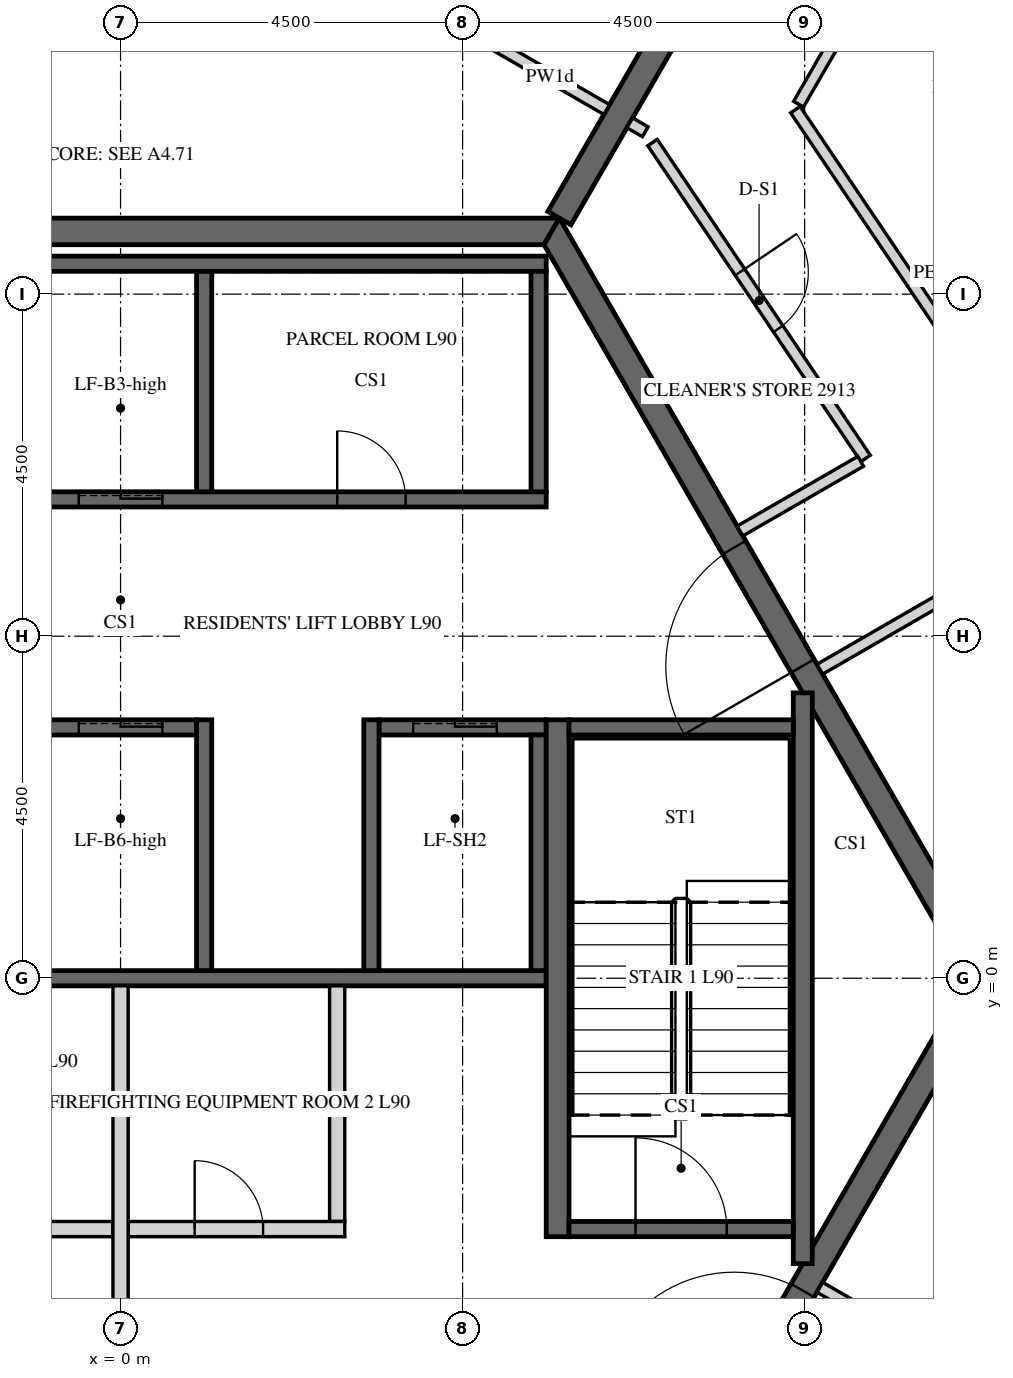
"""IFC4 building model, lengths in metres.
Left out: names, types, materials, properties, quantities, classifications, styles, units other than length and angle.
Written with IfcOpenShell. Run it as: python <this file> out.ifc"""

import sys

from ifc_helpers import new_model, si_unit, direction, frame, frame_2d, origin, place, context, subcontext, project, spatial, polyline, rectangle, outline, extrude, element, fill, save


model = new_model("IFC4")
c1 = context("Model", 3, precision=1e-05, world=origin(), true_north=direction((0.0, 1.0)))
c2 = subcontext(c1, "Body", "Model", "MODEL_VIEW")
j1 = project(units=[si_unit("LENGTHUNIT", "METRE"), si_unit("PLANEANGLEUNIT", "RADIAN")], contexts=[c1])
p1 = place(None, origin())
s1 = spatial("IfcSite", under=j1, at=p1, CompositionType="ELEMENT")
p2 = place(p1, origin())
s2 = spatial("IfcBuilding", under=s1, at=p2, CompositionType="ELEMENT")
p3 = place(p2, frame((0.0, 0.0, 372.9)))
s3 = spatial("IfcBuildingStorey", under=s2, at=p3, CompositionType="ELEMENT", Elevation=372.9)
p4 = place(p3, frame((5.673, -9.825, -0.15), z_axis=(0.0, 0.0, 1.0), x_axis=(0.499995046907, 0.866028263435, 0.0)))
e1 = element("IfcWall", 1, at=p4, inside=s3, PredefinedType="SHEAR", context=c2, shape_type="SweptSolid", body=[
    extrude(outline(polyline([(-0.101, -0.175), (11.446, -0.175), (11.244, 0.175), (0.101, 0.175), (-0.101, -0.175)])), origin(), (0.0, 0.0, 1.0), 3.55),
])
p5 = place(p4, frame((4.801, 0.0, 0.15)))
e2 = element("IfcOpeningElement", 2, at=p5, cuts=e1, PredefinedType="OPENING", context=c2, shape_type="SweptSolid", body=[
    extrude(rectangle(XDim=1.8, YDim=2.4, at=frame_2d((0.9, 1.2))), frame((0.0, 0.185, 0.0), z_axis=(0.0, -1.0, 0.0), x_axis=(1.0, 0.0, 0.0)), (0.0, 0.0, 1.0), 0.37),
])
p6 = place(p3, frame((11.345, 0.0, -0.15), z_axis=(0.0, 0.0, 1.0), x_axis=(-0.499995046907, 0.866028263435, 0.0)))
e3 = element("IfcWall", 3, at=p6, inside=s3, PredefinedType="SHEAR", context=c2, shape_type="SweptSolid", body=[
    extrude(outline(polyline([(-0.101, -0.175), (11.446, -0.175), (11.244, 0.175), (0.101, 0.175), (-0.101, -0.175)])), origin(), (0.0, 0.0, 1.0), 3.55),
])
p7 = place(p6, frame((4.744, 0.0, 0.15)))
e4 = element("IfcOpeningElement", 4, at=p7, cuts=e3, PredefinedType="OPENING", context=c2, shape_type="SweptSolid", body=[
    extrude(rectangle(XDim=1.8, YDim=2.4, at=frame_2d((0.9, 1.2))), frame((0.0, 0.185, 0.0), z_axis=(0.0, -1.0, 0.0), x_axis=(1.0, 0.0, 0.0)), (0.0, 0.0, 1.0), 0.37),
])
p8 = place(p3, frame((5.673, 9.825, -0.15), z_axis=(0.0, 0.0, 1.0), x_axis=(-1.0, 0.0, 0.0)))
e5 = element("IfcWall", 5, at=p8, inside=s3, PredefinedType="SHEAR", context=c2, shape_type="SweptSolid", body=[
    extrude(outline(polyline([(-0.101, -0.175), (11.446, -0.175), (11.244, 0.175), (0.101, 0.175), (-0.101, -0.175)])), origin(), (0.0, 0.0, 1.0), 3.55),
])
p9 = place(p3, frame((5.773, 10.0, -0.15), z_axis=(0.0, 0.0, 1.0), x_axis=(0.500007911273, 0.866020836161, 0.0)))
e6 = element("IfcWall", 6, at=p9, inside=s3, PredefinedType="SHEAR", context=c2, shape_type="SweptSolid", body=[
    extrude(rectangle(XDim=14.51, YDim=0.35, at=frame_2d((7.255, 0.0))), origin(), (0.0, 0.0, 1.0), 3.55),
])
p10 = place(p9, frame((6.355, 0.0, 0.15)))
e7 = element("IfcOpeningElement", 7, at=p10, cuts=e6, PredefinedType="OPENING", context=c2, shape_type="SweptSolid", body=[
    extrude(rectangle(XDim=1.8, YDim=2.4, at=frame_2d((0.9, 1.2))), frame((0.0, 0.185, 0.0), z_axis=(0.0, -1.0, 0.0), x_axis=(1.0, 0.0, 0.0)), (0.0, 0.0, 1.0), 0.37),
])
p11 = place(p3, frame((-5.6, 6.3, -0.25), z_axis=(0.0, 0.0, 1.0), x_axis=(1.0, 0.0, 0.0)))
e8 = element("IfcWall", 8, at=p11, inside=s3, PredefinedType="SHEAR", context=c2, shape_type="SweptSolid", body=[
    extrude(rectangle(XDim=11.2, YDim=0.2, at=frame_2d((5.6, 0.0))), origin(), (0.0, 0.0, 1.0), 3.9),
])
p12 = place(p11, frame((8.45, 0.0, 0.25)))
e9 = element("IfcOpeningElement", 9, at=p12, cuts=e8, PredefinedType="OPENING", context=c2, shape_type="SweptSolid", body=[
    extrude(rectangle(XDim=0.9, YDim=2.1, at=frame_2d((0.45, 1.05))), frame((0.0, 0.11, 0.0), z_axis=(0.0, -1.0, 0.0), x_axis=(1.0, 0.0, 0.0)), (0.0, 0.0, 1.0), 0.22),
])
p13 = place(p11, frame((0.65, 0.0, 0.25)))
e10 = element("IfcOpeningElement", 10, at=p13, cuts=e8, PredefinedType="OPENING", context=c2, shape_type="SweptSolid", body=[
    extrude(rectangle(XDim=1.1, YDim=2.1, at=frame_2d((0.55, 1.05))), frame((0.0, 0.11, 0.0), z_axis=(0.0, -1.0, 0.0), x_axis=(1.0, 0.0, 0.0)), (0.0, 0.0, 1.0), 0.22),
])
p14 = place(p11, frame((2.85, 0.0, 0.25)))
e11 = element("IfcOpeningElement", 11, at=p14, cuts=e8, PredefinedType="OPENING", context=c2, shape_type="SweptSolid", body=[
    extrude(rectangle(XDim=1.1, YDim=2.1, at=frame_2d((0.55, 1.05))), frame((0.0, 0.11, 0.0), z_axis=(0.0, -1.0, 0.0), x_axis=(1.0, 0.0, 0.0)), (0.0, 0.0, 1.0), 0.22),
])
p15 = place(p11, frame((5.05, 0.0, 0.25)))
e12 = element("IfcOpeningElement", 12, at=p15, cuts=e8, PredefinedType="OPENING", context=c2, shape_type="SweptSolid", body=[
    extrude(rectangle(XDim=1.1, YDim=2.1, at=frame_2d((0.55, 1.05))), frame((0.0, 0.11, 0.0), z_axis=(0.0, -1.0, 0.0), x_axis=(1.0, 0.0, 0.0)), (0.0, 0.0, 1.0), 0.22),
])
p16 = place(p3, frame((-5.6, 9.4, -0.25), z_axis=(0.0, 0.0, 1.0), x_axis=(1.0, 0.0, 0.0)))
e13 = element("IfcWall", 13, at=p16, inside=s3, PredefinedType="SHEAR", context=c2, shape_type="SweptSolid", body=[
    extrude(rectangle(XDim=11.2, YDim=0.2, at=frame_2d((5.6, 0.0))), origin(), (0.0, 0.0, 1.0), 3.9),
])
for number, where, z_axis, x_axis in (
    (14, (1.1, 6.4, -0.25), (0.0, 0.0, 1.0), (0.0, 1.0, 0.0)),
    (15, (5.5, 6.4, -0.25), (0.0, 0.0, 1.0), (0.0, 1.0, 0.0)),
):
    element("IfcWall", number, at=place(p3, frame(where, z_axis=z_axis, x_axis=x_axis)), inside=s3, PredefinedType="SHEAR", context=c2, shape_type="SweptSolid", body=[
        extrude(rectangle(XDim=2.9, YDim=0.2, at=frame_2d((1.45, 0.0))), origin(), (0.0, 0.0, 1.0), 3.9),
    ])
p17 = place(p3, frame((-5.6, 3.3, -0.25), z_axis=(0.0, 0.0, 1.0), x_axis=(1.0, 0.0, 0.0)))
e16 = element("IfcWall", 16, at=p17, inside=s3, PredefinedType="SHEAR", context=c2, shape_type="SweptSolid", body=[
    extrude(rectangle(XDim=6.6, YDim=0.2, at=frame_2d((3.3, 0.0))), origin(), (0.0, 0.0, 1.0), 3.9),
])
p18 = place(p17, frame((0.65, 0.0, 0.25)))
e17 = element("IfcOpeningElement", 17, at=p18, cuts=e16, PredefinedType="OPENING", context=c2, shape_type="SweptSolid", body=[
    extrude(rectangle(XDim=1.1, YDim=2.1, at=frame_2d((0.55, 1.05))), frame((0.0, 0.11, 0.0), z_axis=(0.0, -1.0, 0.0), x_axis=(1.0, 0.0, 0.0)), (0.0, 0.0, 1.0), 0.22),
])
p19 = place(p17, frame((2.85, 0.0, 0.25)))
e18 = element("IfcOpeningElement", 18, at=p19, cuts=e16, PredefinedType="OPENING", context=c2, shape_type="SweptSolid", body=[
    extrude(rectangle(XDim=1.1, YDim=2.1, at=frame_2d((0.55, 1.05))), frame((0.0, 0.11, 0.0), z_axis=(0.0, -1.0, 0.0), x_axis=(1.0, 0.0, 0.0)), (0.0, 0.0, 1.0), 0.22),
])
p20 = place(p17, frame((5.05, 0.0, 0.25)))
e19 = element("IfcOpeningElement", 19, at=p20, cuts=e16, PredefinedType="OPENING", context=c2, shape_type="SweptSolid", body=[
    extrude(rectangle(XDim=1.1, YDim=2.1, at=frame_2d((0.55, 1.05))), frame((0.0, 0.11, 0.0), z_axis=(0.0, -1.0, 0.0), x_axis=(1.0, 0.0, 0.0)), (0.0, 0.0, 1.0), 0.22),
])
p21 = place(p3, frame((3.4, 3.3, -0.25), z_axis=(0.0, 0.0, 1.0), x_axis=(1.0, 0.0, 0.0)))
e20 = element("IfcWall", 20, at=p21, inside=s3, PredefinedType="SHEAR", context=c2, shape_type="SweptSolid", body=[
    extrude(rectangle(XDim=2.2, YDim=0.2, at=frame_2d((1.1, 0.0))), origin(), (0.0, 0.0, 1.0), 3.9),
])
p22 = place(p21, frame((0.45, 0.0, 0.25)))
e21 = element("IfcOpeningElement", 21, at=p22, cuts=e20, PredefinedType="OPENING", context=c2, shape_type="SweptSolid", body=[
    extrude(rectangle(XDim=1.1, YDim=2.1, at=frame_2d((0.55, 1.05))), frame((0.0, 0.11, 0.0), z_axis=(0.0, -1.0, 0.0), x_axis=(1.0, 0.0, 0.0)), (0.0, 0.0, 1.0), 0.22),
])
p23 = place(p3, frame((-5.6, 0.0, -0.25), z_axis=(0.0, 0.0, 1.0), x_axis=(1.0, 0.0, 0.0)))
e22 = element("IfcWall", 22, at=p23, inside=s3, PredefinedType="SHEAR", context=c2, shape_type="SweptSolid", body=[
    extrude(rectangle(XDim=11.2, YDim=0.2, at=frame_2d((5.6, 0.0))), origin(), (0.0, 0.0, 1.0), 3.9),
])
for number, where, z_axis, x_axis in (
    (23, (1.1, 0.1, -0.25), (0.0, 0.0, 1.0), (0.0, 1.0, 0.0)),
    (24, (3.3, 0.1, -0.25), (0.0, 0.0, 1.0), (0.0, 1.0, 0.0)),
):
    element("IfcWall", number, at=place(p3, frame(where, z_axis=z_axis, x_axis=x_axis)), inside=s3, PredefinedType="SHEAR", context=c2, shape_type="SweptSolid", body=[
        extrude(rectangle(XDim=3.3, YDim=0.2, at=frame_2d((1.65, 0.0))), origin(), (0.0, 0.0, 1.0), 3.9),
    ])
p24 = place(p3, frame((5.5, 0.1, -0.25), z_axis=(0.0, 0.0, 1.0), x_axis=(0.0, 1.0, 0.0)))
e25 = element("IfcWall", 25, at=p24, inside=s3, PredefinedType="SHEAR", context=c2, shape_type="SweptSolid", body=[
    extrude(rectangle(XDim=3.1, YDim=0.2, at=frame_2d((1.55, 0.0))), origin(), (0.0, 0.0, 1.0), 3.9),
])
p25 = place(p3, frame((-5.6, -3.3, 0.0), z_axis=(0.0, 0.0, 1.0), x_axis=(1.0, 0.0, 0.0)))
e26 = element("IfcWall", 26, at=p25, inside=s3, PredefinedType="PARTITIONING", context=c2, shape_type="SweptSolid", body=[
    extrude(rectangle(XDim=5.5, YDim=0.2, at=frame_2d((2.75, 0.0))), origin(), (0.0, 0.0, 1.0), 3.65),
])
p26 = place(p25, frame((2.3, 0.0, 0.0)))
e27 = element("IfcOpeningElement", 27, at=p26, cuts=e26, PredefinedType="OPENING", context=c2, shape_type="SweptSolid", body=[
    extrude(rectangle(XDim=0.9, YDim=2.1, at=frame_2d((0.45, 1.05))), frame((0.0, 0.11, 0.0), z_axis=(0.0, -1.0, 0.0), x_axis=(1.0, 0.0, 0.0)), (0.0, 0.0, 1.0), 0.22),
])
p27 = place(p3, frame((0.1, -3.3, 0.0), z_axis=(0.0, 0.0, 1.0), x_axis=(1.0, 0.0, 0.0)))
e28 = element("IfcWall", 28, at=p27, inside=s3, PredefinedType="PARTITIONING", context=c2, shape_type="SweptSolid", body=[
    extrude(rectangle(XDim=2.85, YDim=0.2, at=frame_2d((1.425, 0.0))), origin(), (0.0, 0.0, 1.0), 3.65),
])
p28 = place(p27, frame((0.875, 0.0, 0.0)))
e29 = element("IfcOpeningElement", 29, at=p28, cuts=e28, PredefinedType="OPENING", context=c2, shape_type="SweptSolid", body=[
    extrude(rectangle(XDim=0.9, YDim=2.1, at=frame_2d((0.45, 1.05))), frame((0.0, 0.11, 0.0), z_axis=(0.0, -1.0, 0.0), x_axis=(1.0, 0.0, 0.0)), (0.0, 0.0, 1.0), 0.22),
])
p29 = place(p3, frame((2.85, -3.2, 0.0), z_axis=(0.0, 0.0, 1.0), x_axis=(0.0, 1.0, 0.0)))
e30 = element("IfcWall", 30, at=p29, inside=s3, PredefinedType="PARTITIONING", context=c2, shape_type="SweptSolid", body=[
    extrude(rectangle(XDim=3.1, YDim=0.2, at=frame_2d((1.55, 0.0))), origin(), (0.0, 0.0, 1.0), 3.65),
])
p30 = place(p3, frame((0.0, -6.2, 0.0), z_axis=(0.0, 0.0, 1.0), x_axis=(0.0, 1.0, 0.0)))
e31 = element("IfcWall", 31, at=p30, inside=s3, PredefinedType="PARTITIONING", context=c2, shape_type="SweptSolid", body=[
    extrude(rectangle(XDim=6.1, YDim=0.2, at=frame_2d((3.05, 0.0))), origin(), (0.0, 0.0, 1.0), 3.65),
])
p31 = place(p3, frame((5.75, -3.4, -0.25), z_axis=(0.0, 0.0, 1.0), x_axis=(0.0, 1.0, 0.0)))
e32 = element("IfcWall", 32, at=p31, inside=s3, PredefinedType="SHEAR", context=c2, shape_type="SweptSolid", body=[
    extrude(rectangle(XDim=6.8, YDim=0.3, at=frame_2d((3.4, 0.0))), origin(), (0.0, 0.0, 1.0), 3.9),
])
p32 = place(p3, frame((8.975, -3.755, -0.25), z_axis=(0.0, 0.0, 1.0), x_axis=(0.0, 1.0, 0.0)))
e33 = element("IfcWall", 33, at=p32, inside=s3, PredefinedType="SHEAR", context=c2, shape_type="SweptSolid", body=[
    extrude(rectangle(XDim=7.51, YDim=0.25, at=frame_2d((3.755, 0.0))), origin(), (0.0, 0.0, 1.0), 3.9),
])
p33 = place(p3, frame((5.9, 3.3, -0.25), z_axis=(0.0, 0.0, 1.0), x_axis=(1.0, 0.0, 0.0)))
e34 = element("IfcWall", 34, at=p33, inside=s3, PredefinedType="SHEAR", context=c2, shape_type="SweptSolid", body=[
    extrude(rectangle(XDim=2.95, YDim=0.2, at=frame_2d((1.475, 0.0))), origin(), (0.0, 0.0, 1.0), 3.9),
])
p34 = place(p3, frame((5.9, -3.3, -0.25), z_axis=(0.0, 0.0, 1.0), x_axis=(1.0, 0.0, 0.0)))
e35 = element("IfcWall", 35, at=p34, inside=s3, PredefinedType="SHEAR", context=c2, shape_type="SweptSolid", body=[
    extrude(rectangle(XDim=2.95, YDim=0.2, at=frame_2d((1.475, 0.0))), origin(), (0.0, 0.0, 1.0), 3.9),
])
p35 = place(p34, frame((0.875, 0.0, 0.25)))
e36 = element("IfcOpeningElement", 36, at=p35, cuts=e35, PredefinedType="OPENING", context=c2, shape_type="SweptSolid", body=[
    extrude(rectangle(XDim=1.2, YDim=2.4, at=frame_2d((0.6, 1.2))), frame((0.0, 0.11, 0.0), z_axis=(0.0, -1.0, 0.0), x_axis=(1.0, 0.0, 0.0)), (0.0, 0.0, 1.0), 0.22),
])
p36 = place(p3, frame((4.902, 12.291, 0.0), z_axis=(0.0, 0.0, 1.0), x_axis=(0.866074815912, -0.499914405916, 0.0)))
e37 = element("IfcWall", 37, at=p36, inside=s3, PredefinedType="PARTITIONING", context=c2, shape_type="SweptSolid", body=[
    extrude(rectangle(XDim=1.725, YDim=0.15, at=frame_2d((0.862, 0.0))), origin(), (0.0, 0.0, 1.0), 2.47),
])
p37 = place(p3, frame((10.697, -12.973, 0.0), z_axis=(0.0, 0.0, 1.0), x_axis=(0.499991115059, 0.866030533446, 0.0)))
e38 = element("IfcWall", 38, at=p37, inside=s3, PredefinedType="PARTITIONING", context=c2, shape_type="SweptSolid", body=[
    extrude(rectangle(XDim=13.504, YDim=0.15, at=frame_2d((6.752, 0.0))), origin(), (0.0, 0.0, 1.0), 2.47),
])
p38 = place(p37, frame((3.175, 0.0, 0.0)))
e39 = element("IfcOpeningElement", 39, at=p38, cuts=e38, PredefinedType="OPENING", context=c2, shape_type="SweptSolid", body=[
    extrude(rectangle(XDim=1.0, YDim=2.1, at=frame_2d((0.5, 1.05))), frame((0.0, 0.085, 0.0), z_axis=(0.0, -1.0, 0.0), x_axis=(1.0, 0.0, 0.0)), (0.0, 0.0, 1.0), 0.17),
])
p39 = place(p3, frame((17.401, -1.21, 0.0), z_axis=(0.0, 0.0, 1.0), x_axis=(-0.559186729505, 0.829041736914, 0.0)))
e40 = element("IfcWall", 40, at=p39, inside=s3, PredefinedType="PARTITIONING", context=c2, shape_type="SweptSolid", body=[
    extrude(rectangle(XDim=15.243, YDim=0.15, at=frame_2d((7.621, 0.0))), origin(), (0.0, 0.0, 1.0), 2.47),
])
p40 = place(p39, frame((5.802, 0.0, 0.0)))
e41 = element("IfcOpeningElement", 41, at=p40, cuts=e40, PredefinedType="OPENING", context=c2, shape_type="SweptSolid", body=[
    extrude(rectangle(XDim=1.0, YDim=2.1, at=frame_2d((0.5, 1.05))), frame((0.0, 0.085, 0.0), z_axis=(0.0, -1.0, 0.0), x_axis=(1.0, 0.0, 0.0)), (0.0, 0.0, 1.0), 0.17),
])
p41 = place(p3, frame((8.92, 11.499, 0.0), z_axis=(0.0, 0.0, 1.0), x_axis=(0.499984314267, 0.866034459757, 0.0)))
e42 = element("IfcWall", 42, at=p41, inside=s3, PredefinedType="PARTITIONING", context=c2, shape_type="SweptSolid", body=[
    extrude(rectangle(XDim=5.784, YDim=0.15, at=frame_2d((2.892, 0.0))), origin(), (0.0, 0.0, 1.0), 2.47),
])
p42 = place(p3, frame((9.2, 4.066, 0.0), z_axis=(0.0, 0.0, 1.0), x_axis=(0.866011447264, 0.500024172624, 0.0)))
e43 = element("IfcWall", 43, at=p42, inside=s3, PredefinedType="PARTITIONING", context=c2, shape_type="SweptSolid", body=[
    extrude(rectangle(XDim=2.055, YDim=0.15, at=frame_2d((1.027, 0.0))), origin(), (0.0, 0.0, 1.0), 2.47),
])
p43 = place(p3, frame((12.555, -6.003, 0.0), z_axis=(0.0, 0.0, 1.0), x_axis=(-0.866016658288, 0.500015147339, 0.0)))
e44 = element("IfcWall", 44, at=p43, inside=s3, PredefinedType="PARTITIONING", context=c2, shape_type="SweptSolid", body=[
    extrude(rectangle(XDim=3.875, YDim=0.15, at=frame_2d((1.938, 0.0))), origin(), (0.0, 0.0, 1.0), 2.47),
])
p44 = place(p3, frame((6.699, 11.254, 0.0), z_axis=(0.0, 0.0, 1.0), x_axis=(0.865544827262, -0.500831460673, 0.0)))
e45 = element("IfcWall", 45, at=p44, inside=s3, PredefinedType="PARTITIONING", context=c2, shape_type="SweptSolid", body=[
    extrude(rectangle(XDim=0.235, YDim=0.15, at=frame_2d((0.117, 0.0))), origin(), (0.0, 0.0, 1.0), 2.47),
])
p45 = place(p3, frame((6.999, 10.994, 0.0), z_axis=(0.0, 0.0, 1.0), x_axis=(0.55918759866, -0.82904115067, 0.0)))
e46 = element("IfcWall", 46, at=p45, inside=s3, PredefinedType="PARTITIONING", context=c2, shape_type="SweptSolid", body=[
    extrude(rectangle(XDim=5.013, YDim=0.15, at=frame_2d((2.506, 0.0))), origin(), (0.0, 0.0, 1.0), 2.47),
])
p46 = place(p45, frame((2.057, 0.0, 0.0)))
e47 = element("IfcOpeningElement", 47, at=p46, cuts=e46, PredefinedType="OPENING", context=c2, shape_type="SweptSolid", body=[
    extrude(rectangle(XDim=0.9, YDim=2.1, at=frame_2d((0.45, 1.05))), frame((0.0, 0.085, 0.0), z_axis=(0.0, -1.0, 0.0), x_axis=(1.0, 0.0, 0.0)), (0.0, 0.0, 1.0), 0.17),
])
p47 = place(p3, frame((9.737, 6.801, 0.0), z_axis=(0.0, 0.0, 1.0), x_axis=(-0.866045829247, -0.499964620392, 0.0)))
e48 = element("IfcWall", 48, at=p47, inside=s3, PredefinedType="PARTITIONING", context=c2, shape_type="SweptSolid", body=[
    extrude(rectangle(XDim=1.833, YDim=0.15, at=frame_2d((0.917, 0.0))), origin(), (0.0, 0.0, 1.0), 2.47),
])
p48 = place(p7, origin())
e49 = element("IfcDoor", 49, at=p48, inside=s3, OperationType="DOUBLE_DOOR_SINGLE_SWING", PredefinedType="DOOR", context=c2, shape_type="SweptSolid", body=[
    extrude(rectangle(XDim=1.8, YDim=2.4, at=frame_2d((0.9, 1.2))), frame((0.0, 0.025, 0.0), z_axis=(0.0, -1.0, 0.0), x_axis=(1.0, 0.0, 0.0)), (0.0, 0.0, 1.0), 0.05),
])
fill(e4, e49)
p49 = place(p5, origin())
e50 = element("IfcDoor", 50, at=p49, inside=s3, OperationType="DOUBLE_DOOR_SINGLE_SWING", PredefinedType="DOOR", context=c2, shape_type="SweptSolid", body=[
    extrude(rectangle(XDim=1.8, YDim=2.4, at=frame_2d((0.9, 1.2))), frame((0.0, 0.025, 0.0), z_axis=(0.0, -1.0, 0.0), x_axis=(1.0, 0.0, 0.0)), (0.0, 0.0, 1.0), 0.05),
])
fill(e2, e50)
p50 = place(p28, origin())
e51 = element("IfcDoor", 51, at=p50, inside=s3, OperationType="SINGLE_SWING_LEFT", PredefinedType="DOOR", context=c2, shape_type="SweptSolid", body=[
    extrude(rectangle(XDim=0.9, YDim=2.1, at=frame_2d((0.45, 1.05))), frame((0.0, 0.025, 0.0), z_axis=(0.0, -1.0, 0.0), x_axis=(1.0, 0.0, 0.0)), (0.0, 0.0, 1.0), 0.05),
])
fill(e29, e51)
p51 = place(p12, origin())
e52 = element("IfcDoor", 52, at=p51, inside=s3, OperationType="SINGLE_SWING_LEFT", PredefinedType="DOOR", context=c2, shape_type="SweptSolid", body=[
    extrude(rectangle(XDim=0.9, YDim=2.1, at=frame_2d((0.45, 1.05))), frame((0.0, 0.025, 0.0), z_axis=(0.0, -1.0, 0.0), x_axis=(1.0, 0.0, 0.0)), (0.0, 0.0, 1.0), 0.05),
])
fill(e9, e52)
p52 = place(p35, origin())
e53 = element("IfcDoor", 53, at=p52, inside=s3, OperationType="SINGLE_SWING_LEFT", PredefinedType="DOOR", context=c2, shape_type="SweptSolid", body=[
    extrude(rectangle(XDim=1.2, YDim=2.4, at=frame_2d((0.6, 1.2))), frame((0.0, 0.025, 0.0), z_axis=(0.0, -1.0, 0.0), x_axis=(1.0, 0.0, 0.0)), (0.0, 0.0, 1.0), 0.05),
])
fill(e36, e53)
p53 = place(p15, origin())
e54 = element("IfcDoor", 54, at=p53, inside=s3, OperationType="SLIDING_TO_LEFT", PredefinedType="DOOR", context=c2, shape_type="SweptSolid", body=[
    extrude(rectangle(XDim=1.1, YDim=2.1, at=frame_2d((0.55, 1.05))), frame((0.0, 0.025, 0.0), z_axis=(0.0, -1.0, 0.0), x_axis=(1.0, 0.0, 0.0)), (0.0, 0.0, 1.0), 0.05),
])
fill(e12, e54)
p54 = place(p20, origin())
e55 = element("IfcDoor", 55, at=p54, inside=s3, OperationType="SLIDING_TO_LEFT", PredefinedType="DOOR", context=c2, shape_type="SweptSolid", body=[
    extrude(rectangle(XDim=1.1, YDim=2.1, at=frame_2d((0.55, 1.05))), frame((0.0, 0.025, 0.0), z_axis=(0.0, -1.0, 0.0), x_axis=(1.0, 0.0, 0.0)), (0.0, 0.0, 1.0), 0.05),
])
fill(e19, e55)
p55 = place(p22, origin())
e56 = element("IfcDoor", 56, at=p55, inside=s3, OperationType="SLIDING_TO_LEFT", PredefinedType="DOOR", context=c2, shape_type="SweptSolid", body=[
    extrude(rectangle(XDim=1.1, YDim=2.1, at=frame_2d((0.55, 1.05))), frame((0.0, 0.025, 0.0), z_axis=(0.0, -1.0, 0.0), x_axis=(1.0, 0.0, 0.0)), (0.0, 0.0, 1.0), 0.05),
])
fill(e21, e56)
p56 = place(p46, origin())
e57 = element("IfcDoor", 57, at=p56, inside=s3, OperationType="SINGLE_SWING_RIGHT", PredefinedType="DOOR", context=c2, shape_type="SweptSolid", body=[
    extrude(rectangle(XDim=0.9, YDim=2.1, at=frame_2d((0.45, 1.05))), frame((0.0, 0.025, 0.0), z_axis=(0.0, -1.0, 0.0), x_axis=(1.0, 0.0, 0.0)), (0.0, 0.0, 1.0), 0.05),
])
fill(e47, e57)
save(model, sys.argv[1])
